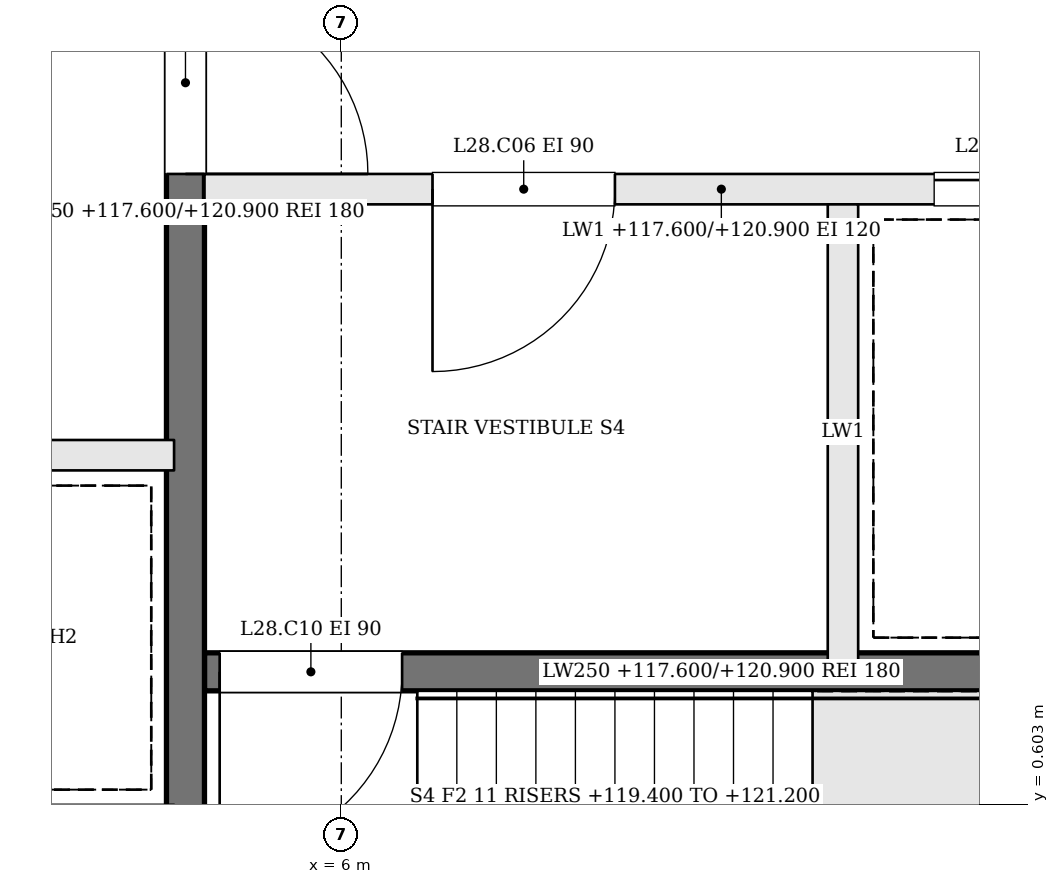
"""IFC4 building model, lengths in metres.
Left out: names, types, materials, properties, quantities, classifications, styles, units other than length and angle.
Written with IfcOpenShell. Run it as: python <this file> out.ifc"""

import sys

from ifc_helpers import new_model, si_unit, direction, frame, frame_2d, origin, place, context, subcontext, project, spatial, rectangle, extrude, element, fill, save


model = new_model("IFC4")
c1 = context("Model", 3, precision=1e-05, world=origin(), true_north=direction((0.0, 1.0)))
c2 = subcontext(c1, "Body", "Model", "MODEL_VIEW")
j1 = project(units=[si_unit("LENGTHUNIT", "METRE"), si_unit("PLANEANGLEUNIT", "RADIAN")], contexts=[c1])
p1 = place(None, origin())
s1 = spatial("IfcSite", under=j1, at=p1, CompositionType="ELEMENT")
p2 = place(p1, origin())
s2 = spatial("IfcBuilding", under=s1, at=p2, CompositionType="ELEMENT")
p3 = place(p2, frame((0.0, 0.0, 117.6)))
s3 = spatial("IfcBuildingStorey", under=s2, at=p3, CompositionType="ELEMENT", Elevation=117.6)
p4 = place(p3, frame((11.9, 4.65, 0.0), z_axis=(0.0, 0.0, 1.0), x_axis=(-1.0, 0.0, 0.0)))
e1 = element("IfcWall", 1, at=p4, inside=s3, PredefinedType="SOLIDWALL", context=c2, shape_type="SweptSolid", body=[
    extrude(rectangle(XDim=6.8, YDim=0.2, at=frame_2d((3.4, 0.0))), origin(), (0.0, 0.0, 1.0), 3.3),
])
p5 = place(p4, frame((4.1, 0.0, 0.0)))
e2 = element("IfcOpeningElement", 2, at=p5, cuts=e1, PredefinedType="OPENING", context=c2, shape_type="SweptSolid", body=[
    extrude(rectangle(XDim=1.2, YDim=2.1, at=frame_2d((0.6, 1.05))), frame((0.0, 0.11, 0.0), z_axis=(0.0, -1.0, 0.0), x_axis=(1.0, 0.0, 0.0)), (0.0, 0.0, 1.0), 0.22),
])
p6 = place(p4, frame((0.8, 0.0, 0.0)))
e3 = element("IfcOpeningElement", 3, at=p6, cuts=e1, PredefinedType="OPENING", context=c2, shape_type="SweptSolid", body=[
    extrude(rectangle(XDim=1.2, YDim=2.1, at=frame_2d((0.6, 1.05))), frame((0.0, 0.11, 0.0), z_axis=(0.0, -1.0, 0.0), x_axis=(1.0, 0.0, 0.0)), (0.0, 0.0, 1.0), 0.22),
])
p7 = place(p3, frame((11.9, 1.475, 0.0), z_axis=(0.0, 0.0, 1.0), x_axis=(-1.0, 0.0, 0.0)))
e4 = element("IfcWall", 4, at=p7, inside=s3, PredefinedType="SOLIDWALL", context=c2, shape_type="SweptSolid", body=[
    extrude(rectangle(XDim=6.8, YDim=0.25, at=frame_2d((3.4, 0.0))), origin(), (0.0, 0.0, 1.0), 3.3),
])
p8 = place(p7, frame((5.5, 0.0, 0.0)))
e5 = element("IfcOpeningElement", 5, at=p8, cuts=e4, PredefinedType="OPENING", context=c2, shape_type="SweptSolid", body=[
    extrude(rectangle(XDim=1.2, YDim=2.1, at=frame_2d((0.6, 1.05))), frame((0.0, 0.135, 0.0), z_axis=(0.0, -1.0, 0.0), x_axis=(1.0, 0.0, 0.0)), (0.0, 0.0, 1.0), 0.27),
])
p9 = place(p3, frame((9.3, 4.55, 0.0), z_axis=(0.0, 0.0, 1.0), x_axis=(0.0, -1.0, 0.0)))
e6 = element("IfcWall", 6, at=p9, inside=s3, PredefinedType="SOLIDWALL", context=c2, shape_type="SweptSolid", body=[
    extrude(rectangle(XDim=3.0, YDim=0.2, at=frame_2d((1.5, 0.0))), origin(), (0.0, 0.0, 1.0), 3.3),
])
p10 = place(p3, frame((4.975, 10.9, 0.0), z_axis=(0.0, 0.0, 1.0), x_axis=(0.0, -1.0, 0.0)))
e7 = element("IfcWall", 7, at=p10, inside=s3, PredefinedType="SOLIDWALL", context=c2, shape_type="SweptSolid", body=[
    extrude(rectangle(XDim=12.8, YDim=0.25, at=frame_2d((6.4, 0.0))), origin(), (0.0, 0.0, 1.0), 3.3),
])
p11 = place(p10, frame((4.95, 0.0, 0.0)))
e8 = element("IfcOpeningElement", 8, at=p11, cuts=e7, PredefinedType="OPENING", context=c2, shape_type="SweptSolid", body=[
    extrude(rectangle(XDim=1.2, YDim=2.1, at=frame_2d((0.6, 1.05))), frame((0.0, 0.135, 0.0), z_axis=(0.0, -1.0, 0.0), x_axis=(1.0, 0.0, 0.0)), (0.0, 0.0, 1.0), 0.27),
])
p12 = place(p3, frame((-4.9, 2.9, 0.0), z_axis=(0.0, 0.0, 1.0), x_axis=(1.0, 0.0, 0.0)))
e9 = element("IfcWall", 9, at=p12, inside=s3, PredefinedType="SOLIDWALL", context=c2, shape_type="SweptSolid", body=[
    extrude(rectangle(XDim=9.8, YDim=0.2, at=frame_2d((4.9, 0.0))), origin(), (0.0, 0.0, 1.0), 3.3),
])
p13 = place(p12, frame((0.675, 0.0, 0.0)))
e10 = element("IfcOpeningElement", 10, at=p13, cuts=e9, PredefinedType="OPENING", context=c2, shape_type="SweptSolid", body=[
    extrude(rectangle(XDim=1.1, YDim=2.1, at=frame_2d((0.55, 1.05))), frame((0.0, 0.11, 0.0), z_axis=(0.0, -1.0, 0.0), x_axis=(1.0, 0.0, 0.0)), (0.0, 0.0, 1.0), 0.22),
])
p14 = place(p12, frame((3.125, 0.0, 0.0)))
e11 = element("IfcOpeningElement", 11, at=p14, cuts=e9, PredefinedType="OPENING", context=c2, shape_type="SweptSolid", body=[
    extrude(rectangle(XDim=1.1, YDim=2.1, at=frame_2d((0.55, 1.05))), frame((0.0, 0.11, 0.0), z_axis=(0.0, -1.0, 0.0), x_axis=(1.0, 0.0, 0.0)), (0.0, 0.0, 1.0), 0.22),
])
p15 = place(p11, origin())
e12 = element("IfcDoor", 12, at=p15, inside=s3, OperationType="SINGLE_SWING_RIGHT", PredefinedType="DOOR", context=c2, shape_type="SweptSolid", body=[
    extrude(rectangle(XDim=1.2, YDim=2.1, at=frame_2d((0.6, 1.05))), frame((0.0, 0.025, 0.0), z_axis=(0.0, -1.0, 0.0), x_axis=(1.0, 0.0, 0.0)), (0.0, 0.0, 1.0), 0.05),
])
fill(e8, e12)
p16 = place(p5, origin())
e13 = element("IfcDoor", 13, at=p16, inside=s3, OperationType="SINGLE_SWING_RIGHT", PredefinedType="DOOR", context=c2, shape_type="SweptSolid", body=[
    extrude(rectangle(XDim=1.2, YDim=2.1, at=frame_2d((0.6, 1.05))), frame((0.0, 0.025, 0.0), z_axis=(0.0, -1.0, 0.0), x_axis=(1.0, 0.0, 0.0)), (0.0, 0.0, 1.0), 0.05),
])
fill(e2, e13)
p17 = place(p8, origin())
e14 = element("IfcDoor", 14, at=p17, inside=s3, OperationType="SINGLE_SWING_RIGHT", PredefinedType="DOOR", context=c2, shape_type="SweptSolid", body=[
    extrude(rectangle(XDim=1.2, YDim=2.1, at=frame_2d((0.6, 1.05))), frame((0.0, 0.025, 0.0), z_axis=(0.0, -1.0, 0.0), x_axis=(1.0, 0.0, 0.0)), (0.0, 0.0, 1.0), 0.05),
])
fill(e5, e14)
p18 = place(p6, origin())
e15 = element("IfcDoor", 15, at=p18, inside=s3, OperationType="SLIDING_TO_RIGHT", PredefinedType="DOOR", context=c2, shape_type="SweptSolid", body=[
    extrude(rectangle(XDim=1.2, YDim=2.1, at=frame_2d((0.6, 1.05))), frame((0.0, 0.025, 0.0), z_axis=(0.0, -1.0, 0.0), x_axis=(1.0, 0.0, 0.0)), (0.0, 0.0, 1.0), 0.05),
])
fill(e3, e15)
save(model, sys.argv[1])
